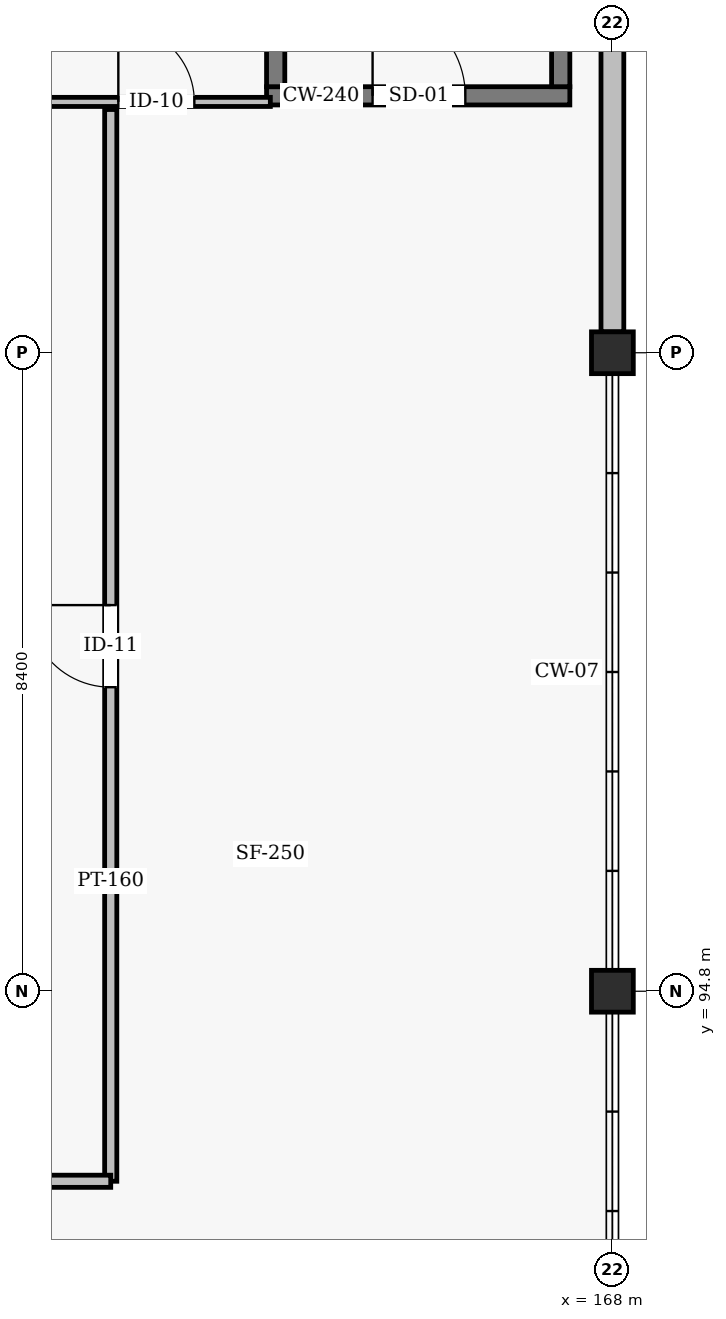
"""IFC4 building model, lengths in metres.
Left out: names, types, materials, properties, quantities, classifications, styles, units other than length and angle.
Written with IfcOpenShell. Run it as: python <this file> out.ifc"""

import sys

from ifc_helpers import new_model, si_unit, direction, frame, frame_2d, origin, origin_2d, place, context, subcontext, project, spatial, rectangle, hollow_rectangle, extrude, element, fill, save


model = new_model("IFC4")
c1 = context("Model", 3, precision=1e-05, world=origin(), true_north=direction((0.0, 1.0)))
c2 = subcontext(c1, "Body", "Model", "MODEL_VIEW")
j1 = project(units=[si_unit("LENGTHUNIT", "METRE"), si_unit("PLANEANGLEUNIT", "RADIAN")], contexts=[c1])
p1 = place(None, origin())
s1 = spatial("IfcSite", under=j1, at=p1, CompositionType="ELEMENT")
p2 = place(p1, origin())
s2 = spatial("IfcBuilding", under=s1, at=p2, CompositionType="ELEMENT")
p3 = place(p2, frame((0.0, 0.0, 24.6)))
s3 = spatial("IfcBuildingStorey", under=s2, at=p3, CompositionType="ELEMENT", Elevation=24.6)
for number, where, z_axis, x_axis in (
    (1, (168.0, 94.8, 0.0), (0.0, 0.0, 1.0), (1.0, 0.0, 0.0)),
    (2, (168.0, 103.2, 0.0), (0.0, 0.0, 1.0), (1.0, 0.0, 0.0)),
):
    element("IfcColumn", number, at=place(p3, frame(where, z_axis=z_axis, x_axis=x_axis)), inside=s3, PredefinedType="COLUMN", context=c2, shape_type="SweptSolid", body=[
        extrude(hollow_rectangle(XDim=0.55, YDim=0.55, WallThickness=0.022, InnerFilletRadius=0.022, OuterFilletRadius=0.044, at=origin_2d()), origin(), (0.0, 0.0, 1.0), 3.6),
    ])
p4 = place(p3, frame((168.0, 103.475, 0.0), z_axis=(0.0, 0.0, 1.0), x_axis=(0.0, 1.0, 0.0)))
e3 = element("IfcWall", 3, at=p4, inside=s3, PredefinedType="SOLIDWALL", context=c2, shape_type="SweptSolid", body=[
    extrude(rectangle(XDim=11.45, YDim=0.3, at=frame_2d((5.725, 0.0))), origin(), (0.0, 0.0, 1.0), 2.553),
])
p5 = place(p3, frame((163.45, 106.58, 0.0), z_axis=(0.0, 0.0, 1.0), x_axis=(1.0, 0.0, 0.0)))
e4 = element("IfcWall", 4, at=p5, inside=s3, PredefinedType="SHEAR", context=c2, shape_type="SweptSolid", body=[
    extrude(rectangle(XDim=3.99, YDim=0.24, at=frame_2d((1.995, 0.0))), origin(), (0.0, 0.0, 1.0), 3.345),
])
p6 = place(p5, frame((1.395, 0.0, 0.0)))
e5 = element("IfcOpeningElement", 5, at=p6, cuts=e4, PredefinedType="OPENING", context=c2, shape_type="SweptSolid", body=[
    extrude(rectangle(XDim=1.22, YDim=2.18, at=frame_2d((0.61, 1.09))), frame((0.0, 0.13, 0.0), z_axis=(0.0, -1.0, 0.0), x_axis=(1.0, 0.0, 0.0)), (0.0, 0.0, 1.0), 0.26),
])
for number, where, z_axis, x_axis in (
    (6, (163.57, 106.7, 0.0), (0.0, 0.0, 1.0), (0.0, 1.0, 0.0)),
    (7, (167.32, 106.7, 0.0), (0.0, 0.0, 1.0), (0.0, 1.0, 0.0)),
):
    element("IfcWall", number, at=place(p3, frame(where, z_axis=z_axis, x_axis=x_axis)), inside=s3, PredefinedType="SHEAR", context=c2, shape_type="SweptSolid", body=[
        extrude(rectangle(XDim=7.9, YDim=0.24, at=frame_2d((3.95, 0.0))), origin(), (0.0, 0.0, 1.0), 3.345),
    ])
p7 = place(p3, frame((160.5, 106.5, 0.0), z_axis=(0.0, 0.0, 1.0), x_axis=(1.0, 0.0, 0.0)))
e8 = element("IfcWall", 8, at=p7, inside=s3, PredefinedType="PARTITIONING", context=c2, shape_type="SweptSolid", body=[
    extrude(rectangle(XDim=3.0, YDim=0.12, at=frame_2d((1.5, 0.0))), origin(), (0.0, 0.0, 1.0), 3.345),
])
p8 = place(p7, frame((1.0, 0.0, 0.0)))
e9 = element("IfcOpeningElement", 9, at=p8, cuts=e8, PredefinedType="OPENING", context=c2, shape_type="SweptSolid", body=[
    extrude(rectangle(XDim=1.0, YDim=2.1, at=frame_2d((0.5, 1.05))), frame((0.0, 0.07, 0.0), z_axis=(0.0, -1.0, 0.0), x_axis=(1.0, 0.0, 0.0)), (0.0, 0.0, 1.0), 0.14),
])
p9 = place(p3, frame((161.4, 92.3, 0.0), z_axis=(0.0, 0.0, 1.0), x_axis=(0.0, 1.0, 0.0)))
e10 = element("IfcWall", 10, at=p9, inside=s3, PredefinedType="PARTITIONING", context=c2, shape_type="SweptSolid", body=[
    extrude(rectangle(XDim=14.1, YDim=0.16, at=frame_2d((7.05, 0.0))), origin(), (0.0, 0.0, 1.0), 2.745),
])
p10 = place(p9, frame((6.5, 0.0, 0.0)))
e11 = element("IfcOpeningElement", 11, at=p10, cuts=e10, PredefinedType="OPENING", context=c2, shape_type="SweptSolid", body=[
    extrude(rectangle(XDim=1.08, YDim=2.08, at=frame_2d((0.54, 1.04))), frame((0.0, 0.09, 0.0), z_axis=(0.0, -1.0, 0.0), x_axis=(1.0, 0.0, 0.0)), (0.0, 0.0, 1.0), 0.18),
])
p11 = place(p3, frame((146.0, 92.3, 0.0), z_axis=(0.0, 0.0, 1.0), x_axis=(1.0, 0.0, 0.0)))
e12 = element("IfcWall", 12, at=p11, inside=s3, PredefinedType="PARTITIONING", context=c2, shape_type="SweptSolid", body=[
    extrude(rectangle(XDim=15.4, YDim=0.16, at=frame_2d((7.7, 0.0))), origin(), (0.0, 0.0, 1.0), 2.845),
])
p12 = place(p11, frame((7.1, 0.0, 0.0)))
e13 = element("IfcOpeningElement", 13, at=p12, cuts=e12, PredefinedType="OPENING", context=c2, shape_type="SweptSolid", body=[
    extrude(rectangle(XDim=1.25, YDim=2.12, at=frame_2d((0.625, 1.06))), frame((0.0, 0.09, 0.0), z_axis=(0.0, -1.0, 0.0), x_axis=(1.0, 0.0, 0.0)), (0.0, 0.0, 1.0), 0.18),
])
p13 = place(p6, origin())
e14 = element("IfcDoor", 14, at=p13, inside=s3, OperationType="SINGLE_SWING_LEFT", PredefinedType="DOOR", context=c2, shape_type="SweptSolid", body=[
    extrude(rectangle(XDim=1.22, YDim=2.18, at=frame_2d((0.61, 1.09))), frame((0.0, 0.025, 0.0), z_axis=(0.0, -1.0, 0.0), x_axis=(1.0, 0.0, 0.0)), (0.0, 0.0, 1.0), 0.05),
])
fill(e5, e14)
p14 = place(p8, origin())
e15 = element("IfcDoor", 15, at=p14, inside=s3, OperationType="SINGLE_SWING_LEFT", PredefinedType="DOOR", context=c2, shape_type="SweptSolid", body=[
    extrude(rectangle(XDim=1.0, YDim=2.1, at=frame_2d((0.5, 1.05))), frame((0.0, 0.025, 0.0), z_axis=(0.0, -1.0, 0.0), x_axis=(1.0, 0.0, 0.0)), (0.0, 0.0, 1.0), 0.05),
])
fill(e9, e15)
p15 = place(p10, origin())
e16 = element("IfcDoor", 16, at=p15, inside=s3, OperationType="SINGLE_SWING_RIGHT", PredefinedType="DOOR", context=c2, shape_type="SweptSolid", body=[
    extrude(rectangle(XDim=1.08, YDim=2.08, at=frame_2d((0.54, 1.04))), frame((0.0, 0.025, 0.0), z_axis=(0.0, -1.0, 0.0), x_axis=(1.0, 0.0, 0.0)), (0.0, 0.0, 1.0), 0.05),
])
fill(e11, e16)
save(model, sys.argv[1])
